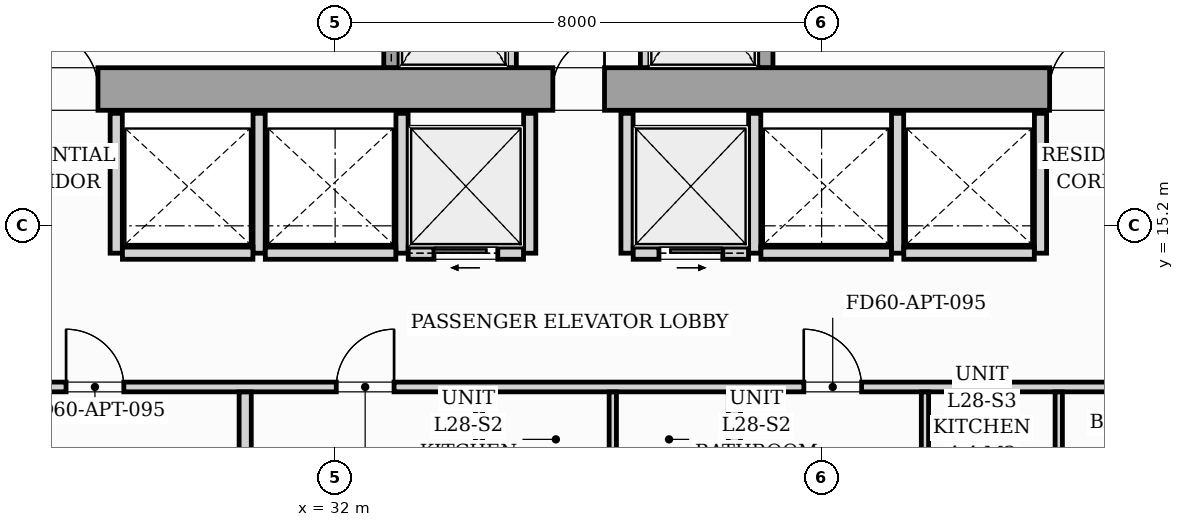
"""IFC4 building model, lengths in metres.
Left out: names, types, materials, properties, quantities, classifications, styles, units other than length and angle.
Written with IfcOpenShell. Run it as: python <this file> out.ifc"""

import sys

from ifc_helpers import new_model, si_unit, direction, frame, frame_2d, origin, origin_2d, place, context, subcontext, project, spatial, rectangle, i_section, extrude, source, transform, mapped, element, fill, save


model = new_model("IFC4")
c1 = context("Model", 3, precision=1e-05, world=origin(), true_north=direction((0.0, 1.0)))
c2 = subcontext(c1, "Body", "Model", "MODEL_VIEW")
j1 = project(units=[si_unit("LENGTHUNIT", "METRE"), si_unit("PLANEANGLEUNIT", "RADIAN")], contexts=[c1])
p1 = place(None, origin())
s1 = spatial("IfcSite", under=j1, at=p1, CompositionType="ELEMENT")
p2 = place(p1, origin())
s2 = spatial("IfcBuilding", under=s1, at=p2, CompositionType="ELEMENT")
p3 = place(p2, frame((0.0, 0.0, 100.2)))
s3 = spatial("IfcBuildingStorey", under=s2, at=p3, CompositionType="ELEMENT", Elevation=100.2)
m1 = source(origin(), c2, "Body", "SweptSolid", [
    extrude(i_section(OverallWidth=0.427, OverallDepth=0.483, WebThickness=0.051, FlangeThickness=0.082, FilletRadius=0.018, at=origin_2d()), origin(), (0.0, 0.0, 1.0), 3.196),
])
for number, where, z_axis, x_axis in (
    (1, (33.12, 17.4, 0.002), (0.0, 0.0, 1.0), (1.0, 0.0, 0.0)),
    (2, (38.88, 17.4, 0.002), (0.0, 0.0, 1.0), (1.0, 0.0, 0.0)),
):
    element("IfcColumn", number, at=place(p3, frame(where, z_axis=z_axis, x_axis=x_axis)), inside=s3, PredefinedType="PILASTER", context=c2, shape_type="MappedRepresentation", body=[
        mapped(m1, transform((0.0, 0.0, 0.0), scale=1.0)),
    ])
p4 = place(p3, frame((26.1, 17.45, 0.0), z_axis=(0.0, 0.0, 1.0), x_axis=(1.0, 0.0, 0.0)))
e3 = element("IfcWall", 3, at=p4, inside=s3, PredefinedType="SHEAR", context=c2, shape_type="SweptSolid", body=[
    extrude(rectangle(XDim=19.8, YDim=0.7, at=frame_2d((9.9, 0.0))), origin(), (0.0, 0.0, 1.0), 3.2),
])
p5 = place(p4, frame((1.05, 0.0, 0.0)))
e4 = element("IfcOpeningElement", 4, at=p5, cuts=e3, PredefinedType="OPENING", context=c2, shape_type="SweptSolid", body=[
    extrude(rectangle(XDim=0.95, YDim=2.06, at=frame_2d((0.475, 1.03))), frame((0.0, 0.36, 0.0), z_axis=(0.0, -1.0, 0.0), x_axis=(1.0, 0.0, 0.0)), (0.0, 0.0, 1.0), 0.72),
])
p6 = place(p4, frame((9.48, 0.0, 0.0)))
e5 = element("IfcOpeningElement", 5, at=p6, cuts=e3, PredefinedType="OPENING", context=c2, shape_type="SweptSolid", body=[
    extrude(rectangle(XDim=0.85, YDim=2.0, at=frame_2d((0.425, 1.0))), frame((0.0, 0.36, 0.0), z_axis=(0.0, -1.0, 0.0), x_axis=(1.0, 0.0, 0.0)), (0.0, 0.0, 1.0), 0.72),
])
p7 = place(p4, frame((17.65, 0.0, 0.0)))
e6 = element("IfcOpeningElement", 6, at=p7, cuts=e3, PredefinedType="OPENING", context=c2, shape_type="SweptSolid", body=[
    extrude(rectangle(XDim=0.95, YDim=2.06, at=frame_2d((0.475, 1.03))), frame((0.0, 0.36, 0.0), z_axis=(0.0, -1.0, 0.0), x_axis=(1.0, 0.0, 0.0)), (0.0, 0.0, 1.0), 0.72),
])
p8 = place(p3, frame((32.925, 17.802, 0.0), z_axis=(0.0, 0.0, 1.0), x_axis=(0.0, 1.0, 0.0)))
e7 = element("IfcWall", 7, at=p8, inside=s3, PredefinedType="SOLIDWALL", context=c2, shape_type="SweptSolid", body=[
    extrude(rectangle(XDim=2.646, YDim=0.25, at=frame_2d((1.323, 0.0))), origin(), (0.0, 0.0, 1.0), 3.2),
])
p9 = place(p8, frame((0.598, 0.0, 0.0)))
e8 = element("IfcOpeningElement", 8, at=p9, cuts=e7, PredefinedType="OPENING", context=c2, shape_type="SweptSolid", body=[
    extrude(rectangle(XDim=1.1, YDim=2.08, at=frame_2d((0.55, 1.04))), frame((0.0, 0.135, 0.0), z_axis=(0.0, -1.0, 0.0), x_axis=(1.0, 0.0, 0.0)), (0.0, 0.0, 1.0), 0.27),
])
for number, where, z_axis, x_axis in (
    (9, (34.9, 17.802, 0.0), (0.0, 0.0, 1.0), (0.0, 1.0, 0.0)),
    (10, (37.1, 17.802, 0.0), (0.0, 0.0, 1.0), (0.0, 1.0, 0.0)),
):
    element("IfcWall", number, at=place(p3, frame(where, z_axis=z_axis, x_axis=x_axis)), inside=s3, PredefinedType="PARTITIONING", context=c2, shape_type="SweptSolid", body=[
        extrude(rectangle(XDim=2.646, YDim=0.16, at=frame_2d((1.323, 0.0))), origin(), (0.0, 0.0, 1.0), 2.94),
    ])
p10 = place(p3, frame((39.075, 17.802, 0.0), z_axis=(0.0, 0.0, 1.0), x_axis=(0.0, 1.0, 0.0)))
e11 = element("IfcWall", 11, at=p10, inside=s3, PredefinedType="SOLIDWALL", context=c2, shape_type="SweptSolid", body=[
    extrude(rectangle(XDim=2.646, YDim=0.25, at=frame_2d((1.323, 0.0))), origin(), (0.0, 0.0, 1.0), 3.2),
])
p11 = place(p10, frame((0.598, 0.0, 0.0)))
e12 = element("IfcOpeningElement", 12, at=p11, cuts=e11, PredefinedType="OPENING", context=c2, shape_type="SweptSolid", body=[
    extrude(rectangle(XDim=1.1, YDim=2.08, at=frame_2d((0.55, 1.04))), frame((0.0, 0.135, 0.0), z_axis=(0.0, -1.0, 0.0), x_axis=(1.0, 0.0, 0.0)), (0.0, 0.0, 1.0), 0.27),
])
for number, where, z_axis, x_axis in (
    (13, (28.4, 14.75, 0.0), (0.0, 0.0, 1.0), (0.0, 1.0, 0.0)),
    (14, (30.75, 14.75, 0.0), (0.0, 0.0, 1.0), (0.0, 1.0, 0.0)),
    (15, (33.1, 14.75, 0.0), (0.0, 0.0, 1.0), (0.0, 1.0, 0.0)),
):
    element("IfcWall", number, at=place(p3, frame(where, z_axis=z_axis, x_axis=x_axis)), inside=s3, PredefinedType="PARTITIONING", context=c2, shape_type="SweptSolid", body=[
        extrude(rectangle(XDim=2.3, YDim=0.2, at=frame_2d((1.15, 0.0))), origin(), (0.0, 0.0, 1.0), 2.94),
    ])
for number, where, z_axis, x_axis in (
    (16, (28.502, 14.75, 0.0), (0.0, 0.0, 1.0), (1.0, 0.0, 0.0)),
    (17, (30.852, 14.75, 0.0), (0.0, 0.0, 1.0), (1.0, 0.0, 0.0)),
):
    element("IfcWall", number, at=place(p3, frame(where, z_axis=z_axis, x_axis=x_axis)), inside=s3, PredefinedType="PARTITIONING", context=c2, shape_type="SweptSolid", body=[
        extrude(rectangle(XDim=2.146, YDim=0.2, at=frame_2d((1.073, 0.0))), origin(), (0.0, 0.0, 1.0), 2.94),
    ])
p12 = place(p3, frame((35.2, 14.75, 0.0), z_axis=(0.0, 0.0, 1.0), x_axis=(0.0, 1.0, 0.0)))
e18 = element("IfcWall", 18, at=p12, inside=s3, PredefinedType="PARTITIONING", context=c2, shape_type="SweptSolid", body=[
    extrude(rectangle(XDim=2.3, YDim=0.2, at=frame_2d((1.15, 0.0))), origin(), (0.0, 0.0, 1.0), 2.94),
])
p13 = place(p3, frame((33.202, 14.75, 0.0), z_axis=(0.0, 0.0, 1.0), x_axis=(1.0, 0.0, 0.0)))
e19 = element("IfcWall", 19, at=p13, inside=s3, PredefinedType="PARTITIONING", context=c2, shape_type="SweptSolid", body=[
    extrude(rectangle(XDim=1.896, YDim=0.2, at=frame_2d((0.948, 0.0))), origin(), (0.0, 0.0, 1.0), 2.94),
])
p14 = place(p13, frame((0.423, 0.0, 0.0)))
e20 = element("IfcOpeningElement", 20, at=p14, cuts=e19, PredefinedType="OPENING", context=c2, shape_type="SweptSolid", body=[
    extrude(rectangle(XDim=1.05, YDim=2.08, at=frame_2d((0.525, 1.04))), frame((0.0, 0.11, 0.0), z_axis=(0.0, -1.0, 0.0), x_axis=(1.0, 0.0, 0.0)), (0.0, 0.0, 1.0), 0.22),
])
for number, where, z_axis, x_axis in (
    (21, (36.8, 14.75, 0.0), (0.0, 0.0, 1.0), (0.0, 1.0, 0.0)),
    (22, (38.9, 14.75, 0.0), (0.0, 0.0, 1.0), (0.0, 1.0, 0.0)),
):
    element("IfcWall", number, at=place(p3, frame(where, z_axis=z_axis, x_axis=x_axis)), inside=s3, PredefinedType="PARTITIONING", context=c2, shape_type="SweptSolid", body=[
        extrude(rectangle(XDim=2.3, YDim=0.2, at=frame_2d((1.15, 0.0))), origin(), (0.0, 0.0, 1.0), 2.94),
    ])
p15 = place(p3, frame((36.902, 14.75, 0.0), z_axis=(0.0, 0.0, 1.0), x_axis=(1.0, 0.0, 0.0)))
e23 = element("IfcWall", 23, at=p15, inside=s3, PredefinedType="PARTITIONING", context=c2, shape_type="SweptSolid", body=[
    extrude(rectangle(XDim=1.896, YDim=0.2, at=frame_2d((0.948, 0.0))), origin(), (0.0, 0.0, 1.0), 2.94),
])
p16 = place(p15, frame((0.423, 0.0, 0.0)))
e24 = element("IfcOpeningElement", 24, at=p16, cuts=e23, PredefinedType="OPENING", context=c2, shape_type="SweptSolid", body=[
    extrude(rectangle(XDim=1.05, YDim=2.08, at=frame_2d((0.525, 1.04))), frame((0.0, 0.11, 0.0), z_axis=(0.0, -1.0, 0.0), x_axis=(1.0, 0.0, 0.0)), (0.0, 0.0, 1.0), 0.22),
])
for number, where, z_axis, x_axis in (
    (25, (41.25, 14.75, 0.0), (0.0, 0.0, 1.0), (0.0, 1.0, 0.0)),
    (26, (43.6, 14.75, 0.0), (0.0, 0.0, 1.0), (0.0, 1.0, 0.0)),
):
    element("IfcWall", number, at=place(p3, frame(where, z_axis=z_axis, x_axis=x_axis)), inside=s3, PredefinedType="PARTITIONING", context=c2, shape_type="SweptSolid", body=[
        extrude(rectangle(XDim=2.3, YDim=0.2, at=frame_2d((1.15, 0.0))), origin(), (0.0, 0.0, 1.0), 2.94),
    ])
for number, where, z_axis, x_axis in (
    (27, (39.002, 14.75, 0.0), (0.0, 0.0, 1.0), (1.0, 0.0, 0.0)),
    (28, (41.352, 14.75, 0.0), (0.0, 0.0, 1.0), (1.0, 0.0, 0.0)),
):
    element("IfcWall", number, at=place(p3, frame(where, z_axis=z_axis, x_axis=x_axis)), inside=s3, PredefinedType="PARTITIONING", context=c2, shape_type="SweptSolid", body=[
        extrude(rectangle(XDim=2.146, YDim=0.2, at=frame_2d((1.073, 0.0))), origin(), (0.0, 0.0, 1.0), 2.94),
    ])
p17 = place(p3, frame((21.5, 12.55, 0.0), z_axis=(0.0, 0.0, 1.0), x_axis=(1.0, 0.0, 0.0)))
e29 = element("IfcWall", 29, at=p17, inside=s3, PredefinedType="PARTITIONING", context=c2, shape_type="SweptSolid", body=[
    extrude(rectangle(XDim=24.38, YDim=0.16, at=frame_2d((12.19, 0.0))), origin(), (0.0, 0.0, 1.0), 2.94),
])
p18 = place(p17, frame((6.075, 0.0, 0.0)))
e30 = element("IfcOpeningElement", 30, at=p18, cuts=e29, PredefinedType="OPENING", context=c2, shape_type="SweptSolid", body=[
    extrude(rectangle(XDim=0.95, YDim=2.06, at=frame_2d((0.475, 1.03))), frame((0.0, 0.09, 0.0), z_axis=(0.0, -1.0, 0.0), x_axis=(1.0, 0.0, 0.0)), (0.0, 0.0, 1.0), 0.18),
])
p19 = place(p17, frame((10.519, 0.0, 0.0)))
e31 = element("IfcOpeningElement", 31, at=p19, cuts=e29, PredefinedType="OPENING", context=c2, shape_type="SweptSolid", body=[
    extrude(rectangle(XDim=0.95, YDim=2.06, at=frame_2d((0.475, 1.03))), frame((0.0, 0.09, 0.0), z_axis=(0.0, -1.0, 0.0), x_axis=(1.0, 0.0, 0.0)), (0.0, 0.0, 1.0), 0.18),
])
p20 = place(p17, frame((18.208, 0.0, 0.0)))
e32 = element("IfcOpeningElement", 32, at=p20, cuts=e29, PredefinedType="OPENING", context=c2, shape_type="SweptSolid", body=[
    extrude(rectangle(XDim=0.95, YDim=2.06, at=frame_2d((0.475, 1.03))), frame((0.0, 0.09, 0.0), z_axis=(0.0, -1.0, 0.0), x_axis=(1.0, 0.0, 0.0)), (0.0, 0.0, 1.0), 0.18),
])
p21 = place(p3, frame((30.521, 5.681, 0.0), z_axis=(0.0, 0.0, 1.0), x_axis=(0.0, 1.0, 0.0)))
e33 = element("IfcWall", 33, at=p21, inside=s3, PredefinedType="PARTITIONING", context=c2, shape_type="SweptSolid", body=[
    extrude(rectangle(XDim=6.787, YDim=0.2, at=frame_2d((3.394, 0.0))), origin(), (0.0, 0.0, 1.0), 2.94),
])
for number, where, z_axis, x_axis in (
    (34, (34.366, 10.362, 0.0), (0.0, 0.0, 1.0), (0.0, 1.0, 0.0)),
    (35, (36.566, 10.362, 0.0), (0.0, 0.0, 1.0), (0.0, 1.0, 0.0)),
):
    element("IfcWall", number, at=place(p3, frame(where, z_axis=z_axis, x_axis=x_axis)), inside=s3, PredefinedType="PARTITIONING", context=c2, shape_type="SweptSolid", body=[
        extrude(rectangle(XDim=2.106, YDim=0.12, at=frame_2d((1.053, 0.0))), origin(), (0.0, 0.0, 1.0), 2.94),
    ])
p22 = place(p3, frame((38.566, 10.362, 0.0), z_axis=(0.0, 0.0, 1.0), x_axis=(0.0, 1.0, 0.0)))
e36 = element("IfcWall", 36, at=p22, inside=s3, PredefinedType="PARTITIONING", context=c2, shape_type="SweptSolid", body=[
    extrude(rectangle(XDim=2.106, YDim=0.2, at=frame_2d((1.053, 0.0))), origin(), (0.0, 0.0, 1.0), 2.94),
])
for number, where, z_axis, x_axis in (
    (37, (41.7, 10.362, 0.0), (0.0, 0.0, 1.0), (0.0, 1.0, 0.0)),
    (38, (43.9, 10.362, 0.0), (0.0, 0.0, 1.0), (0.0, 1.0, 0.0)),
):
    element("IfcWall", number, at=place(p3, frame(where, z_axis=z_axis, x_axis=x_axis)), inside=s3, PredefinedType="PARTITIONING", context=c2, shape_type="SweptSolid", body=[
        extrude(rectangle(XDim=2.106, YDim=0.12, at=frame_2d((1.053, 0.0))), origin(), (0.0, 0.0, 1.0), 2.94),
    ])
m2 = source(origin(), c2, "Body", "SweptSolid", [
    extrude(rectangle(XDim=0.95, YDim=2.06, at=frame_2d((0.475, 1.03))), frame((0.0, 0.025, 0.0), z_axis=(0.0, -1.0, 0.0), x_axis=(1.0, 0.0, 0.0)), (0.0, 0.0, 1.0), 0.05),
])
p23 = place(p5, origin())
e39 = element("IfcDoor", 39, at=p23, inside=s3, OperationType="SINGLE_SWING_LEFT", PredefinedType="DOOR", context=c2, shape_type="MappedRepresentation", body=[
    mapped(m2, transform((0.0, 0.0, 0.0), scale=1.0)),
])
fill(e4, e39)
m3 = source(origin(), c2, "Body", "SweptSolid", [
    extrude(rectangle(XDim=0.85, YDim=2.0, at=frame_2d((0.425, 1.0))), frame((0.0, 0.025, 0.0), z_axis=(0.0, -1.0, 0.0), x_axis=(1.0, 0.0, 0.0)), (0.0, 0.0, 1.0), 0.05),
])
p24 = place(p6, origin())
e40 = element("IfcDoor", 40, at=p24, inside=s3, OperationType="SINGLE_SWING_RIGHT", PredefinedType="DOOR", context=c2, shape_type="MappedRepresentation", body=[
    mapped(m3, transform((0.0, 0.0, 0.0), scale=1.0)),
])
fill(e5, e40)
p25 = place(p7, origin())
e41 = element("IfcDoor", 41, at=p25, inside=s3, OperationType="SINGLE_SWING_RIGHT", PredefinedType="DOOR", context=c2, shape_type="MappedRepresentation", body=[
    mapped(m2, transform((0.0, 0.0, 0.0), scale=1.0)),
])
fill(e6, e41)
m4 = source(origin(), c2, "Body", "SweptSolid", [
    extrude(rectangle(XDim=1.05, YDim=2.08, at=frame_2d((0.525, 1.04))), frame((0.0, 0.025, 0.0), z_axis=(0.0, -1.0, 0.0), x_axis=(1.0, 0.0, 0.0)), (0.0, 0.0, 1.0), 0.05),
])
p26 = place(p14, origin())
e42 = element("IfcDoor", 42, at=p26, inside=s3, OperationType="SLIDING_TO_LEFT", PredefinedType="DOOR", context=c2, shape_type="MappedRepresentation", body=[
    mapped(m4, transform((0.0, 0.0, 0.0), scale=1.0)),
])
fill(e20, e42)
p27 = place(p16, origin())
e43 = element("IfcDoor", 43, at=p27, inside=s3, OperationType="SLIDING_TO_RIGHT", PredefinedType="DOOR", context=c2, shape_type="MappedRepresentation", body=[
    mapped(m4, transform((0.0, 0.0, 0.0), scale=1.0)),
])
fill(e24, e43)
m5 = source(origin(), c2, "Body", "SweptSolid", [
    extrude(rectangle(XDim=0.95, YDim=2.06, at=frame_2d((0.475, 1.03))), frame((0.0, 0.025, 0.0), z_axis=(0.0, -1.0, 0.0), x_axis=(1.0, 0.0, 0.0)), (0.0, 0.0, 1.0), 0.05),
])
p28 = place(p18, origin())
e44 = element("IfcDoor", 44, at=p28, inside=s3, OperationType="SINGLE_SWING_LEFT", PredefinedType="DOOR", context=c2, shape_type="MappedRepresentation", body=[
    mapped(m5, transform((0.0, 0.0, 0.0), scale=1.0)),
])
fill(e30, e44)
p29 = place(p19, origin())
e45 = element("IfcDoor", 45, at=p29, inside=s3, OperationType="SINGLE_SWING_RIGHT", PredefinedType="DOOR", context=c2, shape_type="MappedRepresentation", body=[
    mapped(m5, transform((0.0, 0.0, 0.0), scale=1.0)),
])
fill(e31, e45)
p30 = place(p20, origin())
e46 = element("IfcDoor", 46, at=p30, inside=s3, OperationType="SINGLE_SWING_LEFT", PredefinedType="DOOR", context=c2, shape_type="MappedRepresentation", body=[
    mapped(m5, transform((0.0, 0.0, 0.0), scale=1.0)),
])
fill(e32, e46)
save(model, sys.argv[1])
